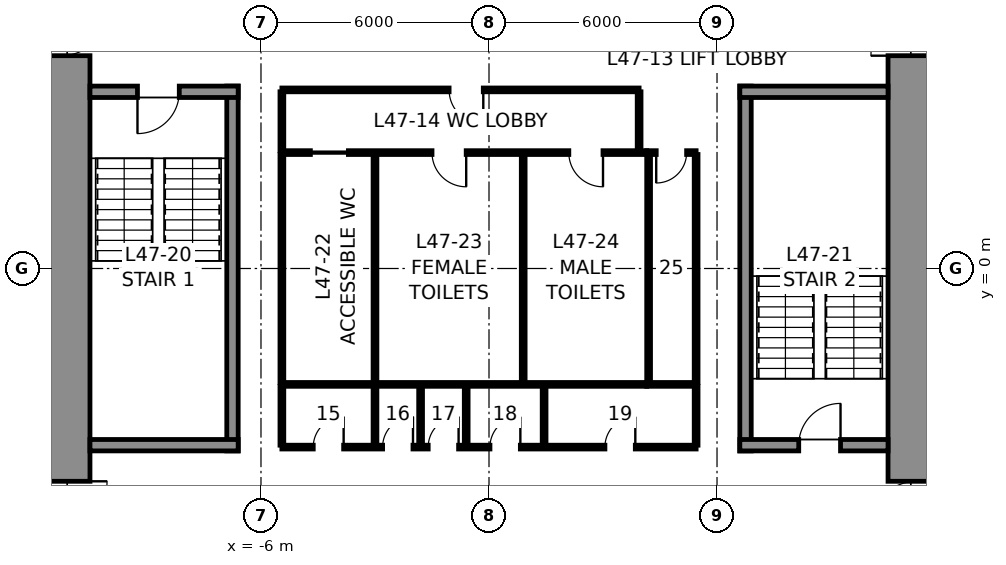
"""IFC4 building model, lengths in metres.
Left out: names, types, materials, properties, quantities, classifications, styles, units other than length and angle.
Written with IfcOpenShell. Run it as: python <this file> out.ifc"""

import sys

from ifc_helpers import new_model, si_unit, direction, frame, frame_2d, origin, place, context, subcontext, project, spatial, rectangle, extrude, element, fill, save


model = new_model("IFC4")
c1 = context("Model", 3, precision=1e-05, world=origin(), true_north=direction((0.0, 1.0)))
c2 = subcontext(c1, "Body", "Model", "MODEL_VIEW")
j1 = project(units=[si_unit("LENGTHUNIT", "METRE"), si_unit("PLANEANGLEUNIT", "RADIAN")], contexts=[c1])
p1 = place(None, origin())
s1 = spatial("IfcSite", under=j1, at=p1, CompositionType="ELEMENT")
p2 = place(p1, origin())
s2 = spatial("IfcBuilding", under=s1, at=p2, CompositionType="ELEMENT")
p3 = place(p2, frame((0.0, 0.0, 217.8)))
s3 = spatial("IfcBuildingStorey", under=s2, at=p3, CompositionType="ELEMENT", Elevation=217.8)
p4 = place(p3, frame((11.25, 10.5, 0.0), z_axis=(0.0, 0.0, 1.0), x_axis=(0.0, -1.0, 0.0)))
e1 = element("IfcWall", 1, at=p4, inside=s3, PredefinedType="SHEAR", context=c2, shape_type="SweptSolid", body=[
    extrude(rectangle(XDim=21.0, YDim=1.5, at=frame_2d((10.5, 0.0))), origin(), (0.0, 0.0, 1.0), 4.0),
])
p5 = place(p4, frame((3.7, 0.0, 0.0)))
e2 = element("IfcOpeningElement", 2, at=p5, cuts=e1, PredefinedType="OPENING", context=c2, shape_type="SweptSolid", body=[
    extrude(rectangle(XDim=1.2, YDim=2.3, at=frame_2d((0.6, 1.15))), frame((0.0, 0.76, 0.0), z_axis=(0.0, -1.0, 0.0), x_axis=(1.0, 0.0, 0.0)), (0.0, 0.0, 1.0), 1.52),
])
p6 = place(p4, frame((16.1, 0.0, 0.0)))
e3 = element("IfcOpeningElement", 3, at=p6, cuts=e1, PredefinedType="OPENING", context=c2, shape_type="SweptSolid", body=[
    extrude(rectangle(XDim=1.2, YDim=2.3, at=frame_2d((0.6, 1.15))), frame((0.0, 0.76, 0.0), z_axis=(0.0, -1.0, 0.0), x_axis=(1.0, 0.0, 0.0)), (0.0, 0.0, 1.0), 1.52),
])
p7 = place(p3, frame((-11.25, -10.5, 0.0), z_axis=(0.0, 0.0, 1.0), x_axis=(0.0, 1.0, 0.0)))
e4 = element("IfcWall", 4, at=p7, inside=s3, PredefinedType="SHEAR", context=c2, shape_type="SweptSolid", body=[
    extrude(rectangle(XDim=21.0, YDim=1.5, at=frame_2d((10.5, 0.0))), origin(), (0.0, 0.0, 1.0), 4.0),
])
p8 = place(p7, frame((16.1, 0.0, 0.0)))
e5 = element("IfcOpeningElement", 5, at=p8, cuts=e4, PredefinedType="OPENING", context=c2, shape_type="SweptSolid", body=[
    extrude(rectangle(XDim=1.2, YDim=2.3, at=frame_2d((0.6, 1.15))), frame((0.0, 0.76, 0.0), z_axis=(0.0, -1.0, 0.0), x_axis=(1.0, 0.0, 0.0)), (0.0, 0.0, 1.0), 1.52),
])
p9 = place(p7, frame((3.7, 0.0, 0.0)))
e6 = element("IfcOpeningElement", 6, at=p9, cuts=e4, PredefinedType="OPENING", context=c2, shape_type="SweptSolid", body=[
    extrude(rectangle(XDim=1.2, YDim=2.3, at=frame_2d((0.6, 1.15))), frame((0.0, 0.76, 0.0), z_axis=(0.0, -1.0, 0.0), x_axis=(1.0, 0.0, 0.0)), (0.0, 0.0, 1.0), 1.52),
])
p10 = place(p3, frame((-6.75, -4.8, 0.0), z_axis=(0.0, 0.0, 1.0), x_axis=(0.0, 1.0, 0.0)))
e7 = element("IfcWall", 7, at=p10, inside=s3, PredefinedType="SOLIDWALL", context=c2, shape_type="SweptSolid", body=[
    extrude(rectangle(XDim=9.6, YDim=0.3, at=frame_2d((4.8, 0.0))), origin(), (0.0, 0.0, 1.0), 3.75),
])
p11 = place(p3, frame((-10.5, 4.65, 0.0), z_axis=(0.0, 0.0, 1.0), x_axis=(1.0, 0.0, 0.0)))
e8 = element("IfcWall", 8, at=p11, inside=s3, PredefinedType="SOLIDWALL", context=c2, shape_type="SweptSolid", body=[
    extrude(rectangle(XDim=3.9, YDim=0.3, at=frame_2d((1.95, 0.0))), origin(), (0.0, 0.0, 1.0), 3.75),
])
p12 = place(p11, frame((1.25, 0.0, 0.0)))
e9 = element("IfcOpeningElement", 9, at=p12, cuts=e8, PredefinedType="OPENING", context=c2, shape_type="SweptSolid", body=[
    extrude(rectangle(XDim=1.1, YDim=2.3, at=frame_2d((0.55, 1.15))), frame((0.0, 0.16, 0.0), z_axis=(0.0, -1.0, 0.0), x_axis=(1.0, 0.0, 0.0)), (0.0, 0.0, 1.0), 0.32),
])
p13 = place(p3, frame((-6.6, -4.65, 0.0), z_axis=(0.0, 0.0, 1.0), x_axis=(-1.0, 0.0, 0.0)))
e10 = element("IfcWall", 10, at=p13, inside=s3, PredefinedType="SOLIDWALL", context=c2, shape_type="SweptSolid", body=[
    extrude(rectangle(XDim=3.9, YDim=0.3, at=frame_2d((1.95, 0.0))), origin(), (0.0, 0.0, 1.0), 3.75),
])
p14 = place(p3, frame((6.75, -4.8, 0.0), z_axis=(0.0, 0.0, 1.0), x_axis=(0.0, 1.0, 0.0)))
e11 = element("IfcWall", 11, at=p14, inside=s3, PredefinedType="SOLIDWALL", context=c2, shape_type="SweptSolid", body=[
    extrude(rectangle(XDim=9.6, YDim=0.3, at=frame_2d((4.8, 0.0))), origin(), (0.0, 0.0, 1.0), 3.75),
])
p15 = place(p3, frame((6.6, 4.65, 0.0), z_axis=(0.0, 0.0, 1.0), x_axis=(1.0, 0.0, 0.0)))
e12 = element("IfcWall", 12, at=p15, inside=s3, PredefinedType="SOLIDWALL", context=c2, shape_type="SweptSolid", body=[
    extrude(rectangle(XDim=3.9, YDim=0.3, at=frame_2d((1.95, 0.0))), origin(), (0.0, 0.0, 1.0), 3.75),
])
p16 = place(p3, frame((10.5, -4.65, 0.0), z_axis=(0.0, 0.0, 1.0), x_axis=(-1.0, 0.0, 0.0)))
e13 = element("IfcWall", 13, at=p16, inside=s3, PredefinedType="SOLIDWALL", context=c2, shape_type="SweptSolid", body=[
    extrude(rectangle(XDim=3.9, YDim=0.3, at=frame_2d((1.95, 0.0))), origin(), (0.0, 0.0, 1.0), 3.75),
])
p17 = place(p16, frame((1.25, 0.0, 0.0)))
e14 = element("IfcOpeningElement", 14, at=p17, cuts=e13, PredefinedType="OPENING", context=c2, shape_type="SweptSolid", body=[
    extrude(rectangle(XDim=1.1, YDim=2.3, at=frame_2d((0.55, 1.15))), frame((0.0, 0.16, 0.0), z_axis=(0.0, -1.0, 0.0), x_axis=(1.0, 0.0, 0.0)), (0.0, 0.0, 1.0), 0.32),
])
p18 = place(p3, frame((-5.45, 3.05, 0.0), z_axis=(0.0, 0.0, 1.0), x_axis=(1.0, 0.0, 0.0)))
e15 = element("IfcWall", 15, at=p18, inside=s3, PredefinedType="PARTITIONING", context=c2, shape_type="SweptSolid", body=[
    extrude(rectangle(XDim=9.6, YDim=0.1, at=frame_2d((4.8, 0.0))), origin(), (0.0, 0.0, 1.0), 3.75),
])
p19 = place(p18, frame((0.75, 0.0, 0.0)))
e16 = element("IfcOpeningElement", 16, at=p19, cuts=e15, PredefinedType="OPENING", context=c2, shape_type="SweptSolid", body=[
    extrude(rectangle(XDim=1.0, YDim=2.3, at=frame_2d((0.5, 1.15))), frame((0.0, 0.06, 0.0), z_axis=(0.0, -1.0, 0.0), x_axis=(1.0, 0.0, 0.0)), (0.0, 0.0, 1.0), 0.12),
])
p20 = place(p18, frame((3.95, 0.0, 0.0)))
e17 = element("IfcOpeningElement", 17, at=p20, cuts=e15, PredefinedType="OPENING", context=c2, shape_type="SweptSolid", body=[
    extrude(rectangle(XDim=0.9, YDim=2.3, at=frame_2d((0.45, 1.15))), frame((0.0, 0.06, 0.0), z_axis=(0.0, -1.0, 0.0), x_axis=(1.0, 0.0, 0.0)), (0.0, 0.0, 1.0), 0.12),
])
p21 = place(p18, frame((7.55, 0.0, 0.0)))
e18 = element("IfcOpeningElement", 18, at=p21, cuts=e15, PredefinedType="OPENING", context=c2, shape_type="SweptSolid", body=[
    extrude(rectangle(XDim=0.9, YDim=2.3, at=frame_2d((0.45, 1.15))), frame((0.0, 0.06, 0.0), z_axis=(0.0, -1.0, 0.0), x_axis=(1.0, 0.0, 0.0)), (0.0, 0.0, 1.0), 0.12),
])
p22 = place(p3, frame((4.15, 3.05, 0.0), z_axis=(0.0, 0.0, 1.0), x_axis=(1.0, 0.0, 0.0)))
e19 = element("IfcWall", 19, at=p22, inside=s3, PredefinedType="PARTITIONING", context=c2, shape_type="SweptSolid", body=[
    extrude(rectangle(XDim=1.3, YDim=0.1, at=frame_2d((0.65, 0.0))), origin(), (0.0, 0.0, 1.0), 3.75),
])
p23 = place(p22, frame((0.25, 0.0, 0.0)))
e20 = element("IfcOpeningElement", 20, at=p23, cuts=e19, PredefinedType="OPENING", context=c2, shape_type="SweptSolid", body=[
    extrude(rectangle(XDim=0.8, YDim=2.3, at=frame_2d((0.4, 1.15))), frame((0.0, 0.06, 0.0), z_axis=(0.0, -1.0, 0.0), x_axis=(1.0, 0.0, 0.0)), (0.0, 0.0, 1.0), 0.12),
])
p24 = place(p3, frame((4.15, -3.05, 0.0), z_axis=(0.0, 0.0, 1.0), x_axis=(-1.0, 0.0, 0.0)))
e21 = element("IfcWall", 21, at=p24, inside=s3, PredefinedType="PARTITIONING", context=c2, shape_type="SweptSolid", body=[
    extrude(rectangle(XDim=9.6, YDim=0.1, at=frame_2d((4.8, 0.0))), origin(), (0.0, 0.0, 1.0), 3.75),
])
p25 = place(p3, frame((5.45, -3.05, 0.0), z_axis=(0.0, 0.0, 1.0), x_axis=(-1.0, 0.0, 0.0)))
e22 = element("IfcWall", 22, at=p25, inside=s3, PredefinedType="PARTITIONING", context=c2, shape_type="SweptSolid", body=[
    extrude(rectangle(XDim=1.3, YDim=0.1, at=frame_2d((0.65, 0.0))), origin(), (0.0, 0.0, 1.0), 3.75),
])
for number, where, z_axis, x_axis in (
    (23, (5.45, 3.0, 0.0), (0.0, 0.0, 1.0), (0.0, -1.0, 0.0)),
    (24, (-5.45, -3.0, 0.0), (0.0, 0.0, 1.0), (0.0, 1.0, 0.0)),
    (25, (-3.0, -3.0, 0.0), (0.0, 0.0, 1.0), (0.0, 1.0, 0.0)),
    (26, (0.9, -3.0, 0.0), (0.0, 0.0, 1.0), (0.0, 1.0, 0.0)),
    (27, (4.2, -3.0, 0.0), (0.0, 0.0, 1.0), (0.0, 1.0, 0.0)),
):
    element("IfcWall", number, at=place(p3, frame(where, z_axis=z_axis, x_axis=x_axis)), inside=s3, PredefinedType="PARTITIONING", context=c2, shape_type="SweptSolid", body=[
        extrude(rectangle(XDim=6.0, YDim=0.1, at=frame_2d((3.0, 0.0))), origin(), (0.0, 0.0, 1.0), 3.75),
    ])
p26 = place(p3, frame((-5.45, 4.7, 0.0), z_axis=(0.0, 0.0, 1.0), x_axis=(1.0, 0.0, 0.0)))
e28 = element("IfcWall", 28, at=p26, inside=s3, PredefinedType="PARTITIONING", context=c2, shape_type="SweptSolid", body=[
    extrude(rectangle(XDim=9.4, YDim=0.1, at=frame_2d((4.7, 0.0))), origin(), (0.0, 0.0, 1.0), 3.75),
])
p27 = place(p26, frame((4.4, 0.0, 0.0)))
e29 = element("IfcOpeningElement", 29, at=p27, cuts=e28, PredefinedType="OPENING", context=c2, shape_type="SweptSolid", body=[
    extrude(rectangle(XDim=0.9, YDim=2.3, at=frame_2d((0.45, 1.15))), frame((0.0, 0.06, 0.0), z_axis=(0.0, -1.0, 0.0), x_axis=(1.0, 0.0, 0.0)), (0.0, 0.0, 1.0), 0.12),
])
for number, where, z_axis, x_axis in (
    (30, (-5.45, 3.1, 0.0), (0.0, 0.0, 1.0), (0.0, 1.0, 0.0)),
    (31, (3.95, 3.1, 0.0), (0.0, 0.0, 1.0), (0.0, 1.0, 0.0)),
):
    element("IfcWall", number, at=place(p3, frame(where, z_axis=z_axis, x_axis=x_axis)), inside=s3, PredefinedType="PARTITIONING", context=c2, shape_type="SweptSolid", body=[
        extrude(rectangle(XDim=1.55, YDim=0.1, at=frame_2d((0.775, 0.0))), origin(), (0.0, 0.0, 1.0), 3.75),
    ])
p28 = place(p3, frame((5.45, -4.7, 0.0), z_axis=(0.0, 0.0, 1.0), x_axis=(-1.0, 0.0, 0.0)))
e32 = element("IfcWall", 32, at=p28, inside=s3, PredefinedType="PARTITIONING", context=c2, shape_type="SweptSolid", body=[
    extrude(rectangle(XDim=10.9, YDim=0.1, at=frame_2d((5.45, 0.0))), origin(), (0.0, 0.0, 1.0), 3.75),
])
p29 = place(p28, frame((9.275, 0.0, 0.0)))
e33 = element("IfcOpeningElement", 33, at=p29, cuts=e32, PredefinedType="OPENING", context=c2, shape_type="SweptSolid", body=[
    extrude(rectangle(XDim=0.8, YDim=2.3, at=frame_2d((0.4, 1.15))), frame((0.0, 0.06, 0.0), z_axis=(0.0, -1.0, 0.0), x_axis=(1.0, 0.0, 0.0)), (0.0, 0.0, 1.0), 0.12),
])
p30 = place(p28, frame((7.45, 0.0, 0.0)))
e34 = element("IfcOpeningElement", 34, at=p30, cuts=e32, PredefinedType="OPENING", context=c2, shape_type="SweptSolid", body=[
    extrude(rectangle(XDim=0.8, YDim=2.3, at=frame_2d((0.4, 1.15))), frame((0.0, 0.06, 0.0), z_axis=(0.0, -1.0, 0.0), x_axis=(1.0, 0.0, 0.0)), (0.0, 0.0, 1.0), 0.12),
])
p31 = place(p28, frame((6.25, 0.0, 0.0)))
e35 = element("IfcOpeningElement", 35, at=p31, cuts=e32, PredefinedType="OPENING", context=c2, shape_type="SweptSolid", body=[
    extrude(rectangle(XDim=0.8, YDim=2.3, at=frame_2d((0.4, 1.15))), frame((0.0, 0.06, 0.0), z_axis=(0.0, -1.0, 0.0), x_axis=(1.0, 0.0, 0.0)), (0.0, 0.0, 1.0), 0.12),
])
p32 = place(p28, frame((4.625, 0.0, 0.0)))
e36 = element("IfcOpeningElement", 36, at=p32, cuts=e32, PredefinedType="OPENING", context=c2, shape_type="SweptSolid", body=[
    extrude(rectangle(XDim=0.8, YDim=2.3, at=frame_2d((0.4, 1.15))), frame((0.0, 0.06, 0.0), z_axis=(0.0, -1.0, 0.0), x_axis=(1.0, 0.0, 0.0)), (0.0, 0.0, 1.0), 0.12),
])
p33 = place(p28, frame((1.6, 0.0, 0.0)))
e37 = element("IfcOpeningElement", 37, at=p33, cuts=e32, PredefinedType="OPENING", context=c2, shape_type="SweptSolid", body=[
    extrude(rectangle(XDim=0.8, YDim=2.3, at=frame_2d((0.4, 1.15))), frame((0.0, 0.06, 0.0), z_axis=(0.0, -1.0, 0.0), x_axis=(1.0, 0.0, 0.0)), (0.0, 0.0, 1.0), 0.12),
])
for number, where, z_axis, x_axis in (
    (38, (-5.45, -3.1, 0.0), (0.0, 0.0, 1.0), (0.0, -1.0, 0.0)),
    (39, (5.45, -3.1, 0.0), (0.0, 0.0, 1.0), (0.0, -1.0, 0.0)),
    (40, (-3.0, -3.1, 0.0), (0.0, 0.0, 1.0), (0.0, -1.0, 0.0)),
    (41, (-1.8, -3.1, 0.0), (0.0, 0.0, 1.0), (0.0, -1.0, 0.0)),
    (42, (-0.6, -3.1, 0.0), (0.0, 0.0, 1.0), (0.0, -1.0, 0.0)),
    (43, (1.45, -3.1, 0.0), (0.0, 0.0, 1.0), (0.0, -1.0, 0.0)),
):
    element("IfcWall", number, at=place(p3, frame(where, z_axis=z_axis, x_axis=x_axis)), inside=s3, PredefinedType="PARTITIONING", context=c2, shape_type="SweptSolid", body=[
        extrude(rectangle(XDim=1.55, YDim=0.1, at=frame_2d((0.775, 0.0))), origin(), (0.0, 0.0, 1.0), 3.75),
    ])
p34 = place(p12, frame((1.1, 0.0, 0.0), z_axis=(0.0, 0.0, 1.0), x_axis=(-1.0, 0.0, 0.0)))
e44 = element("IfcDoor", 44, at=p34, inside=s3, OperationType="SINGLE_SWING_RIGHT", PredefinedType="DOOR", context=c2, shape_type="SweptSolid", body=[
    extrude(rectangle(XDim=1.1, YDim=2.3, at=frame_2d((0.55, 1.15))), frame((0.0, 0.025, 0.0), z_axis=(0.0, -1.0, 0.0), x_axis=(1.0, 0.0, 0.0)), (0.0, 0.0, 1.0), 0.05),
])
fill(e9, e44)
p35 = place(p17, frame((1.1, 0.0, 0.0), z_axis=(0.0, 0.0, 1.0), x_axis=(-1.0, 0.0, 0.0)))
e45 = element("IfcDoor", 45, at=p35, inside=s3, OperationType="SINGLE_SWING_RIGHT", PredefinedType="DOOR", context=c2, shape_type="SweptSolid", body=[
    extrude(rectangle(XDim=1.1, YDim=2.3, at=frame_2d((0.55, 1.15))), frame((0.0, 0.025, 0.0), z_axis=(0.0, -1.0, 0.0), x_axis=(1.0, 0.0, 0.0)), (0.0, 0.0, 1.0), 0.05),
])
fill(e14, e45)
p36 = place(p19, frame((1.0, 0.0, 0.0), z_axis=(0.0, 0.0, 1.0), x_axis=(-1.0, 0.0, 0.0)))
e46 = element("IfcDoor", 46, at=p36, inside=s3, OperationType="SLIDING_TO_LEFT", PredefinedType="DOOR", context=c2, shape_type="SweptSolid", body=[
    extrude(rectangle(XDim=1.0, YDim=2.3, at=frame_2d((0.5, 1.15))), frame((0.0, 0.025, 0.0), z_axis=(0.0, -1.0, 0.0), x_axis=(1.0, 0.0, 0.0)), (0.0, 0.0, 1.0), 0.05),
])
fill(e16, e46)
p37 = place(p20, frame((0.9, 0.0, 0.0), z_axis=(0.0, 0.0, 1.0), x_axis=(-1.0, 0.0, 0.0)))
e47 = element("IfcDoor", 47, at=p37, inside=s3, OperationType="SINGLE_SWING_LEFT", PredefinedType="DOOR", context=c2, shape_type="SweptSolid", body=[
    extrude(rectangle(XDim=0.9, YDim=2.3, at=frame_2d((0.45, 1.15))), frame((0.0, 0.025, 0.0), z_axis=(0.0, -1.0, 0.0), x_axis=(1.0, 0.0, 0.0)), (0.0, 0.0, 1.0), 0.05),
])
fill(e17, e47)
p38 = place(p21, frame((0.9, 0.0, 0.0), z_axis=(0.0, 0.0, 1.0), x_axis=(-1.0, 0.0, 0.0)))
e48 = element("IfcDoor", 48, at=p38, inside=s3, OperationType="SINGLE_SWING_LEFT", PredefinedType="DOOR", context=c2, shape_type="SweptSolid", body=[
    extrude(rectangle(XDim=0.9, YDim=2.3, at=frame_2d((0.45, 1.15))), frame((0.0, 0.025, 0.0), z_axis=(0.0, -1.0, 0.0), x_axis=(1.0, 0.0, 0.0)), (0.0, 0.0, 1.0), 0.05),
])
fill(e18, e48)
p39 = place(p23, frame((0.8, 0.0, 0.0), z_axis=(0.0, 0.0, 1.0), x_axis=(-1.0, 0.0, 0.0)))
e49 = element("IfcDoor", 49, at=p39, inside=s3, OperationType="SINGLE_SWING_RIGHT", PredefinedType="DOOR", context=c2, shape_type="SweptSolid", body=[
    extrude(rectangle(XDim=0.8, YDim=2.3, at=frame_2d((0.4, 1.15))), frame((0.0, 0.025, 0.0), z_axis=(0.0, -1.0, 0.0), x_axis=(1.0, 0.0, 0.0)), (0.0, 0.0, 1.0), 0.05),
])
fill(e20, e49)
p40 = place(p27, frame((0.9, 0.0, 0.0), z_axis=(0.0, 0.0, 1.0), x_axis=(-1.0, 0.0, 0.0)))
e50 = element("IfcDoor", 50, at=p40, inside=s3, OperationType="SINGLE_SWING_LEFT", PredefinedType="DOOR", context=c2, shape_type="SweptSolid", body=[
    extrude(rectangle(XDim=0.9, YDim=2.3, at=frame_2d((0.45, 1.15))), frame((0.0, 0.025, 0.0), z_axis=(0.0, -1.0, 0.0), x_axis=(1.0, 0.0, 0.0)), (0.0, 0.0, 1.0), 0.05),
])
fill(e29, e50)
p41 = place(p29, frame((0.8, 0.0, 0.0), z_axis=(0.0, 0.0, 1.0), x_axis=(-1.0, 0.0, 0.0)))
e51 = element("IfcDoor", 51, at=p41, inside=s3, OperationType="SINGLE_SWING_RIGHT", PredefinedType="DOOR", context=c2, shape_type="SweptSolid", body=[
    extrude(rectangle(XDim=0.8, YDim=2.3, at=frame_2d((0.4, 1.15))), frame((0.0, 0.025, 0.0), z_axis=(0.0, -1.0, 0.0), x_axis=(1.0, 0.0, 0.0)), (0.0, 0.0, 1.0), 0.05),
])
fill(e33, e51)
p42 = place(p30, frame((0.8, 0.0, 0.0), z_axis=(0.0, 0.0, 1.0), x_axis=(-1.0, 0.0, 0.0)))
e52 = element("IfcDoor", 52, at=p42, inside=s3, OperationType="SINGLE_SWING_RIGHT", PredefinedType="DOOR", context=c2, shape_type="SweptSolid", body=[
    extrude(rectangle(XDim=0.8, YDim=2.3, at=frame_2d((0.4, 1.15))), frame((0.0, 0.025, 0.0), z_axis=(0.0, -1.0, 0.0), x_axis=(1.0, 0.0, 0.0)), (0.0, 0.0, 1.0), 0.05),
])
fill(e34, e52)
p43 = place(p31, frame((0.8, 0.0, 0.0), z_axis=(0.0, 0.0, 1.0), x_axis=(-1.0, 0.0, 0.0)))
e53 = element("IfcDoor", 53, at=p43, inside=s3, OperationType="SINGLE_SWING_RIGHT", PredefinedType="DOOR", context=c2, shape_type="SweptSolid", body=[
    extrude(rectangle(XDim=0.8, YDim=2.3, at=frame_2d((0.4, 1.15))), frame((0.0, 0.025, 0.0), z_axis=(0.0, -1.0, 0.0), x_axis=(1.0, 0.0, 0.0)), (0.0, 0.0, 1.0), 0.05),
])
fill(e35, e53)
p44 = place(p32, frame((0.8, 0.0, 0.0), z_axis=(0.0, 0.0, 1.0), x_axis=(-1.0, 0.0, 0.0)))
e54 = element("IfcDoor", 54, at=p44, inside=s3, OperationType="SINGLE_SWING_RIGHT", PredefinedType="DOOR", context=c2, shape_type="SweptSolid", body=[
    extrude(rectangle(XDim=0.8, YDim=2.3, at=frame_2d((0.4, 1.15))), frame((0.0, 0.025, 0.0), z_axis=(0.0, -1.0, 0.0), x_axis=(1.0, 0.0, 0.0)), (0.0, 0.0, 1.0), 0.05),
])
fill(e36, e54)
p45 = place(p33, frame((0.8, 0.0, 0.0), z_axis=(0.0, 0.0, 1.0), x_axis=(-1.0, 0.0, 0.0)))
e55 = element("IfcDoor", 55, at=p45, inside=s3, OperationType="SINGLE_SWING_RIGHT", PredefinedType="DOOR", context=c2, shape_type="SweptSolid", body=[
    extrude(rectangle(XDim=0.8, YDim=2.3, at=frame_2d((0.4, 1.15))), frame((0.0, 0.025, 0.0), z_axis=(0.0, -1.0, 0.0), x_axis=(1.0, 0.0, 0.0)), (0.0, 0.0, 1.0), 0.05),
])
fill(e37, e55)
p46 = place(p8, frame((1.2, 0.0, 0.0), z_axis=(0.0, 0.0, 1.0), x_axis=(-1.0, 0.0, 0.0)))
e56 = element("IfcDoor", 56, at=p46, inside=s3, OperationType="SINGLE_SWING_LEFT", PredefinedType="DOOR", context=c2, shape_type="SweptSolid", body=[
    extrude(rectangle(XDim=1.2, YDim=2.3, at=frame_2d((0.6, 1.15))), frame((0.0, 0.025, 0.0), z_axis=(0.0, -1.0, 0.0), x_axis=(1.0, 0.0, 0.0)), (0.0, 0.0, 1.0), 0.05),
])
fill(e5, e56)
p47 = place(p9, frame((1.2, 0.0, 0.0), z_axis=(0.0, 0.0, 1.0), x_axis=(-1.0, 0.0, 0.0)))
e57 = element("IfcDoor", 57, at=p47, inside=s3, OperationType="SINGLE_SWING_LEFT", PredefinedType="DOOR", context=c2, shape_type="SweptSolid", body=[
    extrude(rectangle(XDim=1.2, YDim=2.3, at=frame_2d((0.6, 1.15))), frame((0.0, 0.025, 0.0), z_axis=(0.0, -1.0, 0.0), x_axis=(1.0, 0.0, 0.0)), (0.0, 0.0, 1.0), 0.05),
])
fill(e6, e57)
p48 = place(p5, frame((1.2, 0.0, 0.0), z_axis=(0.0, 0.0, 1.0), x_axis=(-1.0, 0.0, 0.0)))
e58 = element("IfcDoor", 58, at=p48, inside=s3, OperationType="SINGLE_SWING_LEFT", PredefinedType="DOOR", context=c2, shape_type="SweptSolid", body=[
    extrude(rectangle(XDim=1.2, YDim=2.3, at=frame_2d((0.6, 1.15))), frame((0.0, 0.025, 0.0), z_axis=(0.0, -1.0, 0.0), x_axis=(1.0, 0.0, 0.0)), (0.0, 0.0, 1.0), 0.05),
])
fill(e2, e58)
p49 = place(p6, frame((1.2, 0.0, 0.0), z_axis=(0.0, 0.0, 1.0), x_axis=(-1.0, 0.0, 0.0)))
e59 = element("IfcDoor", 59, at=p49, inside=s3, OperationType="SINGLE_SWING_LEFT", PredefinedType="DOOR", context=c2, shape_type="SweptSolid", body=[
    extrude(rectangle(XDim=1.2, YDim=2.3, at=frame_2d((0.6, 1.15))), frame((0.0, 0.025, 0.0), z_axis=(0.0, -1.0, 0.0), x_axis=(1.0, 0.0, 0.0)), (0.0, 0.0, 1.0), 0.05),
])
fill(e3, e59)
save(model, sys.argv[1])
